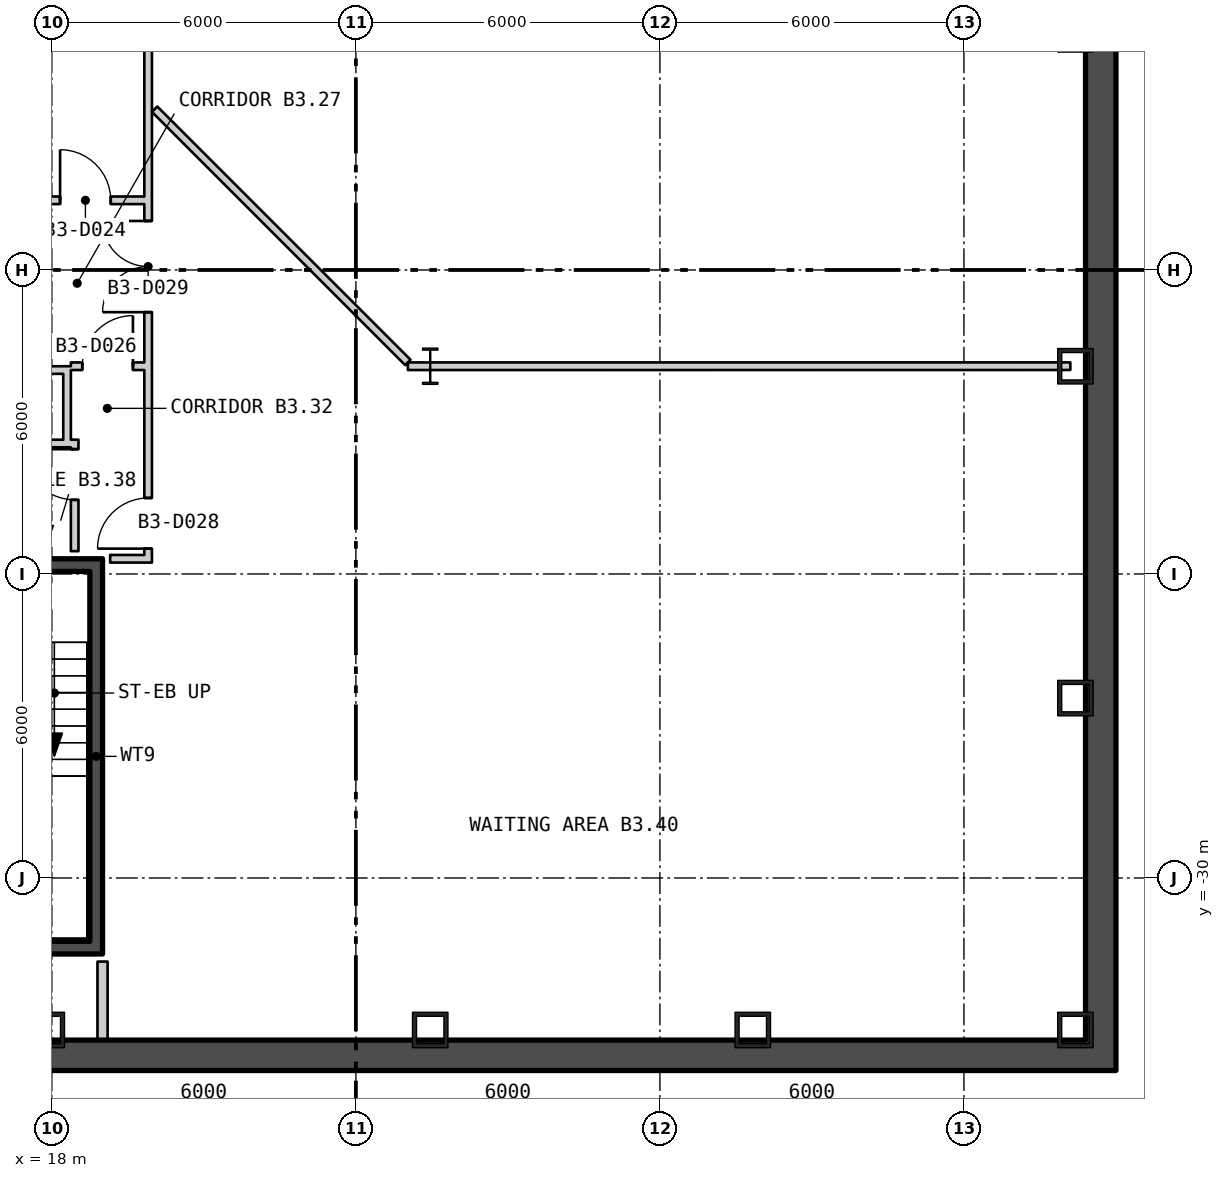
"""IFC4 building model, lengths in metres.
Left out: names, types, materials, properties, quantities, classifications, styles, units other than length and angle.
Written with IfcOpenShell. Run it as: python <this file> out.ifc"""

import sys

from ifc_helpers import new_model, si_unit, direction, frame, frame_2d, origin, origin_2d, place, context, subcontext, project, spatial, rectangle, hollow_rectangle, i_section, extrude, element, fill, save


model = new_model("IFC4")
c1 = context("Model", 3, precision=1e-05, world=origin(), true_north=direction((0.0, 1.0)))
c2 = subcontext(c1, "Body", "Model", "MODEL_VIEW")
j1 = project(units=[si_unit("LENGTHUNIT", "METRE"), si_unit("PLANEANGLEUNIT", "RADIAN")], contexts=[c1])
p1 = place(None, origin())
s1 = spatial("IfcSite", under=j1, at=p1, CompositionType="ELEMENT")
p2 = place(p1, origin())
s2 = spatial("IfcBuilding", under=s1, at=p2, CompositionType="ELEMENT")
p3 = place(p2, frame((0.0, 0.0, -16.8)))
s3 = spatial("IfcBuildingStorey", under=s2, at=p3, CompositionType="ELEMENT", Elevation=-16.8)
for number, where, z_axis, x_axis in (
    (1, (38.2, -33.0, 0.0), (0.0, 0.0, 1.0), (0.0, 1.0, 0.0)),
    (2, (38.2, -26.45, 0.0), (0.0, 0.0, 1.0), (0.0, 1.0, 0.0)),
    (3, (38.2, -19.9, 0.0), (0.0, 0.0, 1.0), (0.0, 1.0, 0.0)),
    (4, (17.9, -33.0, 0.0), (0.0, 0.0, 1.0), (1.0, 0.0, 0.0)),
    (5, (25.467, -33.0, 0.0), (0.0, 0.0, 1.0), (1.0, 0.0, 0.0)),
    (6, (31.833, -33.0, 0.0), (0.0, 0.0, 1.0), (1.0, 0.0, 0.0)),
):
    element("IfcColumn", number, at=place(p3, frame(where, z_axis=z_axis, x_axis=x_axis)), inside=s3, PredefinedType="COLUMN", context=c2, shape_type="SweptSolid", body=[
        extrude(hollow_rectangle(XDim=0.7, YDim=0.7, WallThickness=0.08, at=origin_2d()), origin(), (0.0, 0.0, 1.0), 5.4),
    ])
p4 = place(p3, frame((25.467, -19.9, 0.0), z_axis=(0.0, 0.0, 1.0), x_axis=(1.0, 0.0, 0.0)))
e7 = element("IfcColumn", 7, at=p4, inside=s3, PredefinedType="COLUMN", context=c2, shape_type="SweptSolid", body=[
    extrude(i_section(OverallWidth=0.304, OverallDepth=0.716, WebThickness=0.021, FlangeThickness=0.04, at=origin_2d()), origin(), (0.0, 0.0, 1.0), 5.4),
])
p5 = place(p3, frame((-39.0, -33.5, -0.4), z_axis=(0.0, 0.0, 1.0), x_axis=(1.0, 0.0, 0.0)))
e8 = element("IfcWall", 8, at=p5, inside=s3, PredefinedType="STANDARD", context=c2, shape_type="SweptSolid", body=[
    extrude(rectangle(XDim=78.0, YDim=0.6, at=frame_2d((39.0, 0.0))), origin(), (0.0, 0.0, 1.0), 5.4),
])
p6 = place(p3, frame((38.7, -33.2, -0.4), z_axis=(0.0, 0.0, 1.0), x_axis=(0.0, 1.0, 0.0)))
e9 = element("IfcWall", 9, at=p6, inside=s3, PredefinedType="STANDARD", context=c2, shape_type="SweptSolid", body=[
    extrude(rectangle(XDim=52.8, YDim=0.6, at=frame_2d((26.4, 0.0))), origin(), (0.0, 0.0, 1.0), 5.4),
])
p7 = place(p3, frame((18.875, -31.25, 0.0), z_axis=(0.0, 0.0, 1.0), x_axis=(0.0, 1.0, 0.0)))
e10 = element("IfcWall", 10, at=p7, inside=s3, PredefinedType="SHEAR", context=c2, shape_type="SweptSolid", body=[
    extrude(rectangle(XDim=7.3, YDim=0.25, at=frame_2d((3.65, 0.0))), origin(), (0.0, 0.0, 1.0), 4.95),
])
p8 = place(p3, frame((15.5, -31.375, 0.0), z_axis=(0.0, 0.0, 1.0), x_axis=(1.0, 0.0, 0.0)))
e11 = element("IfcWall", 11, at=p8, inside=s3, PredefinedType="SHEAR", context=c2, shape_type="SweptSolid", body=[
    extrude(rectangle(XDim=3.5, YDim=0.25, at=frame_2d((1.75, 0.0))), origin(), (0.0, 0.0, 1.0), 4.95),
])
p9 = place(p3, frame((15.5, -23.825, 0.0), z_axis=(0.0, 0.0, 1.0), x_axis=(1.0, 0.0, 0.0)))
e12 = element("IfcWall", 12, at=p9, inside=s3, PredefinedType="SHEAR", context=c2, shape_type="SweptSolid", body=[
    extrude(rectangle(XDim=3.5, YDim=0.25, at=frame_2d((1.75, 0.0))), origin(), (0.0, 0.0, 1.0), 4.95),
])
p10 = place(p9, frame((1.15, 0.0, 0.0)))
e13 = element("IfcOpeningElement", 13, at=p10, cuts=e12, PredefinedType="OPENING", context=c2, shape_type="SweptSolid", body=[
    extrude(rectangle(XDim=1.2, YDim=2.1, at=frame_2d((0.6, 1.05))), frame((0.0, 0.135, 0.0), z_axis=(0.0, -1.0, 0.0), x_axis=(1.0, 0.0, 0.0)), (0.0, 0.0, 1.0), 0.27),
])
p11 = place(p3, frame((17.5, -16.625, 0.0), z_axis=(0.0, 0.0, 1.0), x_axis=(1.0, 0.0, 0.0)))
e14 = element("IfcWall", 14, at=p11, inside=s3, PredefinedType="PARTITIONING", context=c2, shape_type="SweptSolid", body=[
    extrude(rectangle(XDim=2.325, YDim=0.15, at=frame_2d((1.163, 0.0))), origin(), (0.0, 0.0, 1.0), 4.95),
])
p12 = place(p11, frame((0.662, 0.0, 0.0)))
e15 = element("IfcOpeningElement", 15, at=p12, cuts=e14, PredefinedType="OPENING", context=c2, shape_type="SweptSolid", body=[
    extrude(rectangle(XDim=1.0, YDim=2.1, at=frame_2d((0.5, 1.05))), frame((0.0, 0.085, 0.0), z_axis=(0.0, -1.0, 0.0), x_axis=(1.0, 0.0, 0.0)), (0.0, 0.0, 1.0), 0.17),
])
for number, where, z_axis, x_axis in (
    (16, (17.575, -21.425, 0.0), (0.0, 0.0, 1.0), (1.0, 0.0, 0.0)),
    (17, (17.575, -19.975, 0.0), (0.0, 0.0, 1.0), (1.0, 0.0, 0.0)),
):
    element("IfcWall", number, at=place(p3, frame(where, z_axis=z_axis, x_axis=x_axis)), inside=s3, PredefinedType="PARTITIONING", context=c2, shape_type="SweptSolid", body=[
        extrude(rectangle(XDim=0.65, YDim=0.15, at=frame_2d((0.325, 0.0))), origin(), (0.0, 0.0, 1.0), 4.95),
    ])
p13 = place(p3, frame((18.3, -21.5, 0.0), z_axis=(0.0, 0.0, 1.0), x_axis=(0.0, 1.0, 0.0)))
e18 = element("IfcWall", 18, at=p13, inside=s3, PredefinedType="PARTITIONING", context=c2, shape_type="SweptSolid", body=[
    extrude(rectangle(XDim=1.6, YDim=0.15, at=frame_2d((0.8, 0.0))), origin(), (0.0, 0.0, 1.0), 4.95),
])
p14 = place(p3, frame((18.375, -19.9, 0.0), z_axis=(0.0, 0.0, 1.0), x_axis=(1.0, 0.0, 0.0)))
e19 = element("IfcWall", 19, at=p14, inside=s3, PredefinedType="PARTITIONING", context=c2, shape_type="SweptSolid", body=[
    extrude(rectangle(XDim=1.45, YDim=0.15, at=frame_2d((0.725, 0.0))), origin(), (0.0, 0.0, 1.0), 4.95),
])
p15 = place(p14, frame((0.225, 0.0, 0.0)))
e20 = element("IfcOpeningElement", 20, at=p15, cuts=e19, PredefinedType="OPENING", context=c2, shape_type="SweptSolid", body=[
    extrude(rectangle(XDim=1.0, YDim=2.1, at=frame_2d((0.5, 1.05))), frame((0.0, 0.085, 0.0), z_axis=(0.0, -1.0, 0.0), x_axis=(1.0, 0.0, 0.0)), (0.0, 0.0, 1.0), 0.17),
])
p16 = place(p3, frame((18.45, -23.55, 0.0), z_axis=(0.0, 0.0, 1.0), x_axis=(0.0, 1.0, 0.0)))
e21 = element("IfcWall", 21, at=p16, inside=s3, PredefinedType="PARTITIONING", context=c2, shape_type="SweptSolid", body=[
    extrude(rectangle(XDim=2.2, YDim=0.15, at=frame_2d((1.1, 0.0))), origin(), (0.0, 0.0, 1.0), 4.95),
])
p17 = place(p16, frame((1.013, 0.0, 0.0)))
e22 = element("IfcOpeningElement", 22, at=p17, cuts=e21, PredefinedType="OPENING", context=c2, shape_type="SweptSolid", body=[
    extrude(rectangle(XDim=1.0, YDim=2.1, at=frame_2d((0.5, 1.05))), frame((0.0, 0.085, 0.0), z_axis=(0.0, -1.0, 0.0), x_axis=(1.0, 0.0, 0.0)), (0.0, 0.0, 1.0), 0.17),
])
p18 = place(p3, frame((19.0, -33.348, 0.0), z_axis=(0.0, 0.0, 1.0), x_axis=(0.0, 1.0, 0.0)))
e23 = element("IfcWall", 23, at=p18, inside=s3, PredefinedType="PARTITIONING", context=c2, shape_type="SweptSolid", body=[
    extrude(rectangle(XDim=1.698, YDim=0.2, at=frame_2d((0.849, 0.0))), origin(), (0.0, 0.0, 1.0), 4.95),
])
p19 = place(p3, frame((19.15, -23.7, 0.0), z_axis=(0.0, 0.0, 1.0), x_axis=(1.0, 0.0, 0.0)))
e24 = element("IfcWall", 24, at=p19, inside=s3, PredefinedType="PARTITIONING", context=c2, shape_type="SweptSolid", body=[
    extrude(rectangle(XDim=0.675, YDim=0.15, at=frame_2d((0.338, 0.0))), origin(), (0.0, 0.0, 1.0), 4.95),
])
p20 = place(p3, frame((19.9, -23.775, 0.0), z_axis=(0.0, 0.0, 1.0), x_axis=(0.0, 1.0, 0.0)))
e25 = element("IfcWall", 25, at=p20, inside=s3, PredefinedType="PARTITIONING", context=c2, shape_type="SweptSolid", body=[
    extrude(rectangle(XDim=21.187, YDim=0.15, at=frame_2d((10.594, 0.0))), origin(), (0.0, 0.0, 1.0), 4.95),
])
p21 = place(p20, frame((0.275, 0.0, 0.0)))
e26 = element("IfcOpeningElement", 26, at=p21, cuts=e25, PredefinedType="OPENING", context=c2, shape_type="SweptSolid", body=[
    extrude(rectangle(XDim=1.0, YDim=2.1, at=frame_2d((0.5, 1.05))), frame((0.0, 0.085, 0.0), z_axis=(0.0, -1.0, 0.0), x_axis=(1.0, 0.0, 0.0)), (0.0, 0.0, 1.0), 0.17),
])
p22 = place(p20, frame((4.942, 0.0, 0.0)))
e27 = element("IfcOpeningElement", 27, at=p22, cuts=e25, PredefinedType="OPENING", context=c2, shape_type="SweptSolid", body=[
    extrude(rectangle(XDim=1.8, YDim=2.1, at=frame_2d((0.9, 1.05))), frame((0.0, 0.085, 0.0), z_axis=(0.0, -1.0, 0.0), x_axis=(1.0, 0.0, 0.0)), (0.0, 0.0, 1.0), 0.17),
])
p23 = place(p20, frame((10.443, 0.0, 0.0)))
e28 = element("IfcOpeningElement", 28, at=p23, cuts=e25, PredefinedType="OPENING", context=c2, shape_type="SweptSolid", body=[
    extrude(rectangle(XDim=1.8, YDim=2.1, at=frame_2d((0.9, 1.05))), frame((0.0, 0.085, 0.0), z_axis=(0.0, -1.0, 0.0), x_axis=(1.0, 0.0, 0.0)), (0.0, 0.0, 1.0), 0.17),
])
p24 = place(p20, frame((19.062, 0.0, 0.0)))
e29 = element("IfcOpeningElement", 29, at=p24, cuts=e25, PredefinedType="OPENING", context=c2, shape_type="SweptSolid", body=[
    extrude(rectangle(XDim=1.0, YDim=2.1, at=frame_2d((0.5, 1.05))), frame((0.0, 0.085, 0.0), z_axis=(0.0, -1.0, 0.0), x_axis=(1.0, 0.0, 0.0)), (0.0, 0.0, 1.0), 0.17),
])
p25 = place(p3, frame((20.028, -14.827, 0.0), z_axis=(0.0, 0.0, 1.0), x_axis=(0.707106781187, -0.707106781187, 0.0)))
e30 = element("IfcWall", 30, at=p25, inside=s3, PredefinedType="PARTITIONING", context=c2, shape_type="SweptSolid", body=[
    extrude(rectangle(XDim=7.068, YDim=0.15, at=frame_2d((3.534, 0.0))), origin(), (0.0, 0.0, 1.0), 4.95),
])
p26 = place(p3, frame((25.026, -19.9, 0.0), z_axis=(0.0, 0.0, 1.0), x_axis=(0.999999997075, 7.6487685e-05, 0.0)))
e31 = element("IfcWall", 31, at=p26, inside=s3, PredefinedType="PARTITIONING", context=c2, shape_type="SweptSolid", body=[
    extrude(rectangle(XDim=13.074, YDim=0.15, at=frame_2d((6.537, 0.0))), origin(), (0.0, 0.0, 1.0), 4.95),
])
p27 = place(p12, origin())
e32 = element("IfcDoor", 32, at=p27, inside=s3, OperationType="SINGLE_SWING_RIGHT", PredefinedType="DOOR", context=c2, shape_type="SweptSolid", body=[
    extrude(rectangle(XDim=1.0, YDim=2.1, at=frame_2d((0.5, 1.05))), frame((0.0, 0.025, 0.0), z_axis=(0.0, -1.0, 0.0), x_axis=(1.0, 0.0, 0.0)), (0.0, 0.0, 1.0), 0.05),
])
fill(e15, e32)
p28 = place(p15, origin())
e33 = element("IfcDoor", 33, at=p28, inside=s3, OperationType="SINGLE_SWING_LEFT", PredefinedType="DOOR", context=c2, shape_type="SweptSolid", body=[
    extrude(rectangle(XDim=1.0, YDim=2.1, at=frame_2d((0.5, 1.05))), frame((0.0, 0.025, 0.0), z_axis=(0.0, -1.0, 0.0), x_axis=(1.0, 0.0, 0.0)), (0.0, 0.0, 1.0), 0.05),
])
fill(e20, e33)
p29 = place(p17, origin())
e34 = element("IfcDoor", 34, at=p29, inside=s3, OperationType="SINGLE_SWING_LEFT", PredefinedType="DOOR", context=c2, shape_type="SweptSolid", body=[
    extrude(rectangle(XDim=1.0, YDim=2.1, at=frame_2d((0.5, 1.05))), frame((0.0, 0.025, 0.0), z_axis=(0.0, -1.0, 0.0), x_axis=(1.0, 0.0, 0.0)), (0.0, 0.0, 1.0), 0.05),
])
fill(e22, e34)
p30 = place(p21, origin())
e35 = element("IfcDoor", 35, at=p30, inside=s3, OperationType="SINGLE_SWING_RIGHT", PredefinedType="DOOR", context=c2, shape_type="SweptSolid", body=[
    extrude(rectangle(XDim=1.0, YDim=2.1, at=frame_2d((0.5, 1.05))), frame((0.0, 0.025, 0.0), z_axis=(0.0, -1.0, 0.0), x_axis=(1.0, 0.0, 0.0)), (0.0, 0.0, 1.0), 0.05),
])
fill(e26, e35)
p31 = place(p22, origin())
e36 = element("IfcDoor", 36, at=p31, inside=s3, OperationType="DOUBLE_DOOR_SINGLE_SWING", PredefinedType="DOOR", context=c2, shape_type="SweptSolid", body=[
    extrude(rectangle(XDim=1.8, YDim=2.1, at=frame_2d((0.9, 1.05))), frame((0.0, 0.025, 0.0), z_axis=(0.0, -1.0, 0.0), x_axis=(1.0, 0.0, 0.0)), (0.0, 0.0, 1.0), 0.05),
])
fill(e27, e36)
save(model, sys.argv[1])
